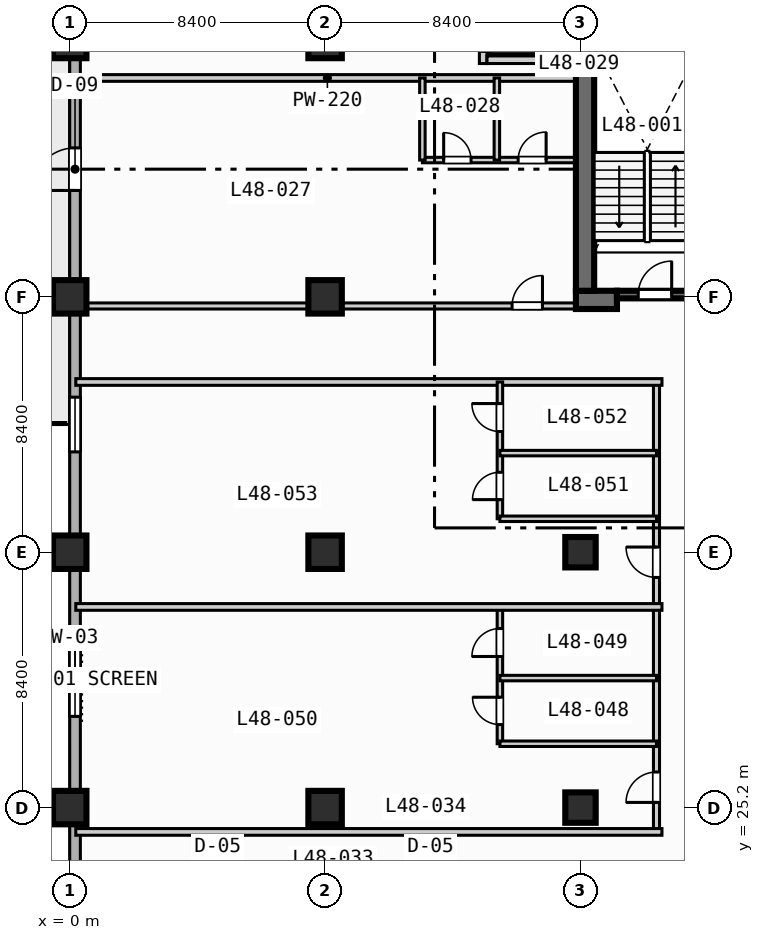
"""IFC4 building model, lengths in metres.
Left out: names, types, materials, properties, quantities, classifications, styles, units other than length and angle.
Written with IfcOpenShell. Run it as: python <this file> out.ifc"""

import sys

from ifc_helpers import new_model, si_unit, direction, frame, frame_2d, origin, origin_2d, place, context, subcontext, project, spatial, rectangle, extrude, element, fill, save


model = new_model("IFC4")
c1 = context("Model", 3, precision=1e-05, world=origin(), true_north=direction((0.0, 1.0)))
c2 = subcontext(c1, "Body", "Model", "MODEL_VIEW")
j1 = project(units=[si_unit("LENGTHUNIT", "METRE"), si_unit("PLANEANGLEUNIT", "RADIAN")], contexts=[c1])
p1 = place(None, origin())
s1 = spatial("IfcSite", under=j1, at=p1, CompositionType="ELEMENT")
p2 = place(p1, origin())
s2 = spatial("IfcBuilding", under=s1, at=p2, CompositionType="ELEMENT")
p3 = place(p2, frame((0.0, 0.0, 197.6)))
s3 = spatial("IfcBuildingStorey", under=s2, at=p3, CompositionType="ELEMENT", Elevation=197.6)
p4 = place(p3, frame((16.65, 41.9, 0.0), z_axis=(0.0, 0.0, 1.0), x_axis=(1.0, 0.0, 0.0)))
e1 = element("IfcWall", 1, at=p4, inside=s3, PredefinedType="SHEAR", context=c2, shape_type="SweptSolid", body=[
    extrude(rectangle(XDim=1.35, YDim=0.6, at=frame_2d((0.675, 0.0))), origin(), (0.0, 0.0, 1.0), 3.47),
])
p5 = place(p3, frame((16.95, 42.2, 0.0), z_axis=(0.0, 0.0, 1.0), x_axis=(0.0, 1.0, 0.0)))
e2 = element("IfcWall", 2, at=p5, inside=s3, PredefinedType="SHEAR", context=c2, shape_type="SweptSolid", body=[
    extrude(rectangle(XDim=16.35, YDim=0.6, at=frame_2d((8.175, 0.0))), origin(), (0.0, 0.0, 1.0), 3.47),
])
for number, where, z_axis, x_axis in (
    (3, (0.0, 25.2, 0.0), (0.0, 0.0, 1.0), (1.0, 0.0, 0.0)),
    (4, (0.0, 33.6, 0.0), (0.0, 0.0, 1.0), (1.0, 0.0, 0.0)),
    (5, (0.0, 42.0, 0.0), (0.0, 0.0, 1.0), (1.0, 0.0, 0.0)),
    (6, (0.0, 50.4, 0.0), (0.0, 0.0, 1.0), (1.0, 0.0, 0.0)),
    (7, (8.4, 25.2, 0.0), (0.0, 0.0, 1.0), (1.0, 0.0, 0.0)),
    (8, (8.4, 33.6, 0.0), (0.0, 0.0, 1.0), (1.0, 0.0, 0.0)),
    (9, (8.4, 42.0, 0.0), (0.0, 0.0, 1.0), (1.0, 0.0, 0.0)),
    (10, (8.4, 50.4, 0.0), (0.0, 0.0, 1.0), (1.0, 0.0, 0.0)),
):
    element("IfcColumn", number, at=place(p3, frame(where, z_axis=z_axis, x_axis=x_axis)), inside=s3, PredefinedType="COLUMN", context=c2, shape_type="SweptSolid", body=[
        extrude(rectangle(XDim=1.1, YDim=1.1, at=origin_2d()), origin(), (0.0, 0.0, 1.0), 3.7),
    ])
for number, where, z_axis, x_axis in (
    (11, (16.8, 25.2, 0.0), (0.0, 0.0, 1.0), (1.0, 0.0, 0.0)),
    (12, (16.8, 33.6, 0.0), (0.0, 0.0, 1.0), (1.0, 0.0, 0.0)),
):
    element("IfcColumn", number, at=place(p3, frame(where, z_axis=z_axis, x_axis=x_axis)), inside=s3, PredefinedType="COLUMN", context=c2, shape_type="SweptSolid", body=[
        extrude(rectangle(XDim=1.0, YDim=1.0, at=origin_2d()), origin(), (0.0, 0.0, 1.0), 3.7),
    ])
p6 = place(p3, frame((0.175, 3.175, 0.0), z_axis=(0.0, 0.0, 1.0), x_axis=(0.0, 1.0, 0.0)))
e13 = element("IfcWall", 13, at=p6, inside=s3, PredefinedType="STANDARD", context=c2, shape_type="SweptSolid", body=[
    extrude(rectangle(XDim=69.25, YDim=0.35, at=frame_2d((34.625, 0.0))), origin(), (0.0, 0.0, 1.0), 3.47),
])
p7 = place(p6, frame((42.325, 0.0, 0.0)))
e14 = element("IfcOpeningElement", 14, at=p7, cuts=e13, PredefinedType="OPENING", context=c2, shape_type="SweptSolid", body=[
    extrude(rectangle(XDim=1.4, YDim=2.2, at=frame_2d((0.7, 1.1))), frame((0.0, 0.185, 0.0), z_axis=(0.0, -1.0, 0.0), x_axis=(1.0, 0.0, 0.0)), (0.0, 0.0, 1.0), 0.37),
])
p8 = place(p6, frame((25.025, 0.0, 0.85)))
e15 = element("IfcOpeningElement", 15, at=p8, cuts=e13, PredefinedType="OPENING", context=c2, shape_type="SweptSolid", body=[
    extrude(rectangle(XDim=2.4, YDim=1.95, at=frame_2d((1.2, 0.975))), frame((0.0, 0.185, 0.0), z_axis=(0.0, -1.0, 0.0), x_axis=(1.0, 0.0, 0.0)), (0.0, 0.0, 1.0), 0.37),
])
p9 = place(p6, frame((33.725, 0.0, 0.85)))
e16 = element("IfcOpeningElement", 16, at=p9, cuts=e13, PredefinedType="OPENING", context=c2, shape_type="SweptSolid", body=[
    extrude(rectangle(XDim=1.8, YDim=1.8, at=frame_2d((0.9, 0.9))), frame((0.0, 0.185, 0.0), z_axis=(0.0, -1.0, 0.0), x_axis=(1.0, 0.0, 0.0)), (0.0, 0.0, 1.0), 0.37),
])
p10 = place(p6, frame((58.375, 0.0, 0.85)))
e17 = element("IfcOpeningElement", 17, at=p10, cuts=e13, PredefinedType="OPENING", context=c2, shape_type="SweptSolid", body=[
    extrude(rectangle(XDim=1.8, YDim=1.8, at=frame_2d((0.9, 0.9))), frame((0.0, 0.185, 0.0), z_axis=(0.0, -1.0, 0.0), x_axis=(1.0, 0.0, 0.0)), (0.0, 0.0, 1.0), 0.37),
])
p11 = place(p6, frame((64.775, 0.0, 0.85)))
e18 = element("IfcOpeningElement", 18, at=p11, cuts=e13, PredefinedType="OPENING", context=c2, shape_type="SweptSolid", body=[
    extrude(rectangle(XDim=1.8, YDim=1.8, at=frame_2d((0.9, 0.9))), frame((0.0, 0.185, 0.0), z_axis=(0.0, -1.0, 0.0), x_axis=(1.0, 0.0, 0.0)), (0.0, 0.0, 1.0), 0.37),
])
p12 = place(p3, frame((18.0, 42.075, 0.0), z_axis=(0.0, 0.0, 1.0), x_axis=(1.0, 0.0, 0.0)))
e19 = element("IfcWall", 19, at=p12, inside=s3, PredefinedType="SOLIDWALL", context=c2, shape_type="SweptSolid", body=[
    extrude(rectangle(XDim=2.5, YDim=0.25, at=frame_2d((1.25, 0.0))), origin(), (0.0, 0.0, 1.0), 3.47),
])
p13 = place(p12, frame((0.7, 0.0, 0.0)))
e20 = element("IfcOpeningElement", 20, at=p13, cuts=e19, PredefinedType="OPENING", context=c2, shape_type="SweptSolid", body=[
    extrude(rectangle(XDim=1.1, YDim=2.15, at=frame_2d((0.55, 1.075))), frame((0.0, 0.135, 0.0), z_axis=(0.0, -1.0, 0.0), x_axis=(1.0, 0.0, 0.0)), (0.0, 0.0, 1.0), 0.27),
])
p14 = place(p3, frame((13.6, 49.675, 0.0), z_axis=(0.0, 0.0, 1.0), x_axis=(0.0, 1.0, 0.0)))
e21 = element("IfcWall", 21, at=p14, inside=s3, PredefinedType="SOLIDWALL", context=c2, shape_type="SweptSolid", body=[
    extrude(rectangle(XDim=2.75, YDim=0.25, at=frame_2d((1.375, 0.0))), origin(), (0.0, 0.0, 1.0), 3.47),
])
p15 = place(p14, frame((0.4, 0.0, 0.0)))
e22 = element("IfcOpeningElement", 22, at=p15, cuts=e21, PredefinedType="OPENING", context=c2, shape_type="SweptSolid", body=[
    extrude(rectangle(XDim=1.1, YDim=2.15, at=frame_2d((0.55, 1.075))), frame((0.0, 0.135, 0.0), z_axis=(0.0, -1.0, 0.0), x_axis=(1.0, 0.0, 0.0)), (0.0, 0.0, 1.0), 0.27),
])
p16 = place(p3, frame((15.6, 49.675, 0.0), z_axis=(0.0, 0.0, 1.0), x_axis=(0.0, 1.0, 0.0)))
e23 = element("IfcWall", 23, at=p16, inside=s3, PredefinedType="SOLIDWALL", context=c2, shape_type="SweptSolid", body=[
    extrude(rectangle(XDim=2.75, YDim=0.25, at=frame_2d((1.375, 0.0))), origin(), (0.0, 0.0, 1.0), 3.47),
])
p17 = place(p3, frame((13.725, 49.8, 0.0), z_axis=(0.0, 0.0, 1.0), x_axis=(1.0, 0.0, 0.0)))
e24 = element("IfcWall", 24, at=p17, inside=s3, PredefinedType="SOLIDWALL", context=c2, shape_type="SweptSolid", body=[
    extrude(rectangle(XDim=1.75, YDim=0.25, at=frame_2d((0.875, 0.0))), origin(), (0.0, 0.0, 1.0), 3.47),
])
p18 = place(p3, frame((0.35, 41.7, 0.0), z_axis=(0.0, 0.0, 1.0), x_axis=(1.0, 0.0, 0.0)))
e25 = element("IfcWall", 25, at=p18, inside=s3, PredefinedType="PARTITIONING", context=c2, shape_type="SweptSolid", body=[
    extrude(rectangle(XDim=16.25, YDim=0.2, at=frame_2d((8.125, 0.0))), origin(), (0.0, 0.0, 1.0), 2.82),
])
p19 = place(p18, frame((14.2, 0.0, 0.0)))
e26 = element("IfcOpeningElement", 26, at=p19, cuts=e25, PredefinedType="OPENING", context=c2, shape_type="SweptSolid", body=[
    extrude(rectangle(XDim=1.0, YDim=2.15, at=frame_2d((0.5, 1.075))), frame((0.0, 0.11, 0.0), z_axis=(0.0, -1.0, 0.0), x_axis=(1.0, 0.0, 0.0)), (0.0, 0.0, 1.0), 0.22),
])
p20 = place(p3, frame((0.35, 49.2, 0.0), z_axis=(0.0, 0.0, 1.0), x_axis=(1.0, 0.0, 0.0)))
e27 = element("IfcWall", 27, at=p20, inside=s3, PredefinedType="PARTITIONING", context=c2, shape_type="SweptSolid", body=[
    extrude(rectangle(XDim=16.25, YDim=0.22, at=frame_2d((8.125, 0.0))), origin(), (0.0, 0.0, 1.0), 3.47),
])
p21 = place(p3, frame((11.6, 46.5, 0.0), z_axis=(0.0, 0.0, 1.0), x_axis=(1.0, 0.0, 0.0)))
e28 = element("IfcWall", 28, at=p21, inside=s3, PredefinedType="PLUMBINGWALL", context=c2, shape_type="SweptSolid", body=[
    extrude(rectangle(XDim=5.0, YDim=0.18, at=frame_2d((2.5, 0.0))), origin(), (0.0, 0.0, 1.0), 3.47),
])
p22 = place(p21, frame((0.7, 0.0, 0.0)))
e29 = element("IfcOpeningElement", 29, at=p22, cuts=e28, PredefinedType="OPENING", context=c2, shape_type="SweptSolid", body=[
    extrude(rectangle(XDim=0.9, YDim=2.1, at=frame_2d((0.45, 1.05))), frame((0.0, 0.1, 0.0), z_axis=(0.0, -1.0, 0.0), x_axis=(1.0, 0.0, 0.0)), (0.0, 0.0, 1.0), 0.2),
])
p23 = place(p21, frame((3.15, 0.0, 0.0)))
e30 = element("IfcOpeningElement", 30, at=p23, cuts=e28, PredefinedType="OPENING", context=c2, shape_type="SweptSolid", body=[
    extrude(rectangle(XDim=0.92, YDim=2.1, at=frame_2d((0.46, 1.05))), frame((0.0, 0.1, 0.0), z_axis=(0.0, -1.0, 0.0), x_axis=(1.0, 0.0, 0.0)), (0.0, 0.0, 1.0), 0.2),
])
for number, where, z_axis, x_axis in (
    (31, (11.6, 46.5, 0.0), (0.0, 0.0, 1.0), (0.0, 1.0, 0.0)),
    (32, (14.05, 46.5, 0.0), (0.0, 0.0, 1.0), (0.0, 1.0, 0.0)),
):
    element("IfcWall", number, at=place(p3, frame(where, z_axis=z_axis, x_axis=x_axis)), inside=s3, PredefinedType="PLUMBINGWALL", context=c2, shape_type="SweptSolid", body=[
        extrude(rectangle(XDim=2.7, YDim=0.18, at=frame_2d((1.35, 0.0))), origin(), (0.0, 0.0, 1.0), 3.47),
    ])
p24 = place(p3, frame((19.3, 24.4, 0.0), z_axis=(0.0, 0.0, 1.0), x_axis=(0.0, 1.0, 0.0)))
e33 = element("IfcWall", 33, at=p24, inside=s3, PredefinedType="PARTITIONING", context=c2, shape_type="SweptSolid", body=[
    extrude(rectangle(XDim=14.8, YDim=0.2, at=frame_2d((7.4, 0.0))), origin(), (0.0, 0.0, 1.0), 3.47),
])
p25 = place(p24, frame((0.97, 0.0, 0.0)))
e34 = element("IfcOpeningElement", 34, at=p25, cuts=e33, PredefinedType="OPENING", context=c2, shape_type="SweptSolid", body=[
    extrude(rectangle(XDim=1.0, YDim=2.15, at=frame_2d((0.5, 1.075))), frame((0.0, 0.11, 0.0), z_axis=(0.0, -1.0, 0.0), x_axis=(1.0, 0.0, 0.0)), (0.0, 0.0, 1.0), 0.22),
])
p26 = place(p24, frame((8.37, 0.0, 0.0)))
e35 = element("IfcOpeningElement", 35, at=p26, cuts=e33, PredefinedType="OPENING", context=c2, shape_type="SweptSolid", body=[
    extrude(rectangle(XDim=1.0, YDim=2.15, at=frame_2d((0.5, 1.075))), frame((0.0, 0.11, 0.0), z_axis=(0.0, -1.0, 0.0), x_axis=(1.0, 0.0, 0.0)), (0.0, 0.0, 1.0), 0.22),
])
p27 = place(p3, frame((0.2, 24.4, 0.0), z_axis=(0.0, 0.0, 1.0), x_axis=(1.0, 0.0, 0.0)))
e36 = element("IfcWall", 36, at=p27, inside=s3, PredefinedType="PARTITIONING", context=c2, shape_type="SweptSolid", body=[
    extrude(rectangle(XDim=19.28, YDim=0.22, at=frame_2d((9.64, 0.0))), origin(), (0.0, 0.0, 1.0), 3.47),
])
p28 = place(p3, frame((14.15, 27.3, 0.0), z_axis=(0.0, 0.0, 1.0), x_axis=(0.0, 1.0, 0.0)))
e37 = element("IfcWall", 37, at=p28, inside=s3, PredefinedType="PLUMBINGWALL", context=c2, shape_type="SweptSolid", body=[
    extrude(rectangle(XDim=4.5, YDim=0.18, at=frame_2d((2.25, 0.0))), origin(), (0.0, 0.0, 1.0), 3.47),
])
p29 = place(p28, frame((0.63, 0.0, 0.0)))
e38 = element("IfcOpeningElement", 38, at=p29, cuts=e37, PredefinedType="OPENING", context=c2, shape_type="SweptSolid", body=[
    extrude(rectangle(XDim=0.9, YDim=2.1, at=frame_2d((0.45, 1.05))), frame((0.0, 0.1, 0.0), z_axis=(0.0, -1.0, 0.0), x_axis=(1.0, 0.0, 0.0)), (0.0, 0.0, 1.0), 0.2),
])
p30 = place(p28, frame((2.87, 0.0, 0.0)))
e39 = element("IfcOpeningElement", 39, at=p30, cuts=e37, PredefinedType="OPENING", context=c2, shape_type="SweptSolid", body=[
    extrude(rectangle(XDim=0.92, YDim=2.1, at=frame_2d((0.46, 1.05))), frame((0.0, 0.1, 0.0), z_axis=(0.0, -1.0, 0.0), x_axis=(1.0, 0.0, 0.0)), (0.0, 0.0, 1.0), 0.2),
])
for number, where, z_axis, x_axis in (
    (40, (14.15, 27.3, 0.0), (0.0, 0.0, 1.0), (1.0, 0.0, 0.0)),
    (41, (14.15, 29.46, 0.0), (0.0, 0.0, 1.0), (1.0, 0.0, 0.0)),
):
    element("IfcWall", number, at=place(p3, frame(where, z_axis=z_axis, x_axis=x_axis)), inside=s3, PredefinedType="PLUMBINGWALL", context=c2, shape_type="SweptSolid", body=[
        extrude(rectangle(XDim=5.15, YDim=0.18, at=frame_2d((2.575, 0.0))), origin(), (0.0, 0.0, 1.0), 3.47),
    ])
for number, where, z_axis, x_axis in (
    (42, (0.2, 31.8, 0.0), (0.0, 0.0, 1.0), (1.0, 0.0, 0.0)),
    (43, (0.2, 39.2, 0.0), (0.0, 0.0, 1.0), (1.0, 0.0, 0.0)),
):
    element("IfcWall", number, at=place(p3, frame(where, z_axis=z_axis, x_axis=x_axis)), inside=s3, PredefinedType="PARTITIONING", context=c2, shape_type="SweptSolid", body=[
        extrude(rectangle(XDim=19.28, YDim=0.22, at=frame_2d((9.64, 0.0))), origin(), (0.0, 0.0, 1.0), 3.47),
    ])
p31 = place(p3, frame((14.15, 34.7, 0.0), z_axis=(0.0, 0.0, 1.0), x_axis=(0.0, 1.0, 0.0)))
e44 = element("IfcWall", 44, at=p31, inside=s3, PredefinedType="PLUMBINGWALL", context=c2, shape_type="SweptSolid", body=[
    extrude(rectangle(XDim=4.5, YDim=0.18, at=frame_2d((2.25, 0.0))), origin(), (0.0, 0.0, 1.0), 3.47),
])
p32 = place(p31, frame((0.63, 0.0, 0.0)))
e45 = element("IfcOpeningElement", 45, at=p32, cuts=e44, PredefinedType="OPENING", context=c2, shape_type="SweptSolid", body=[
    extrude(rectangle(XDim=0.9, YDim=2.1, at=frame_2d((0.45, 1.05))), frame((0.0, 0.1, 0.0), z_axis=(0.0, -1.0, 0.0), x_axis=(1.0, 0.0, 0.0)), (0.0, 0.0, 1.0), 0.2),
])
p33 = place(p31, frame((2.87, 0.0, 0.0)))
e46 = element("IfcOpeningElement", 46, at=p33, cuts=e44, PredefinedType="OPENING", context=c2, shape_type="SweptSolid", body=[
    extrude(rectangle(XDim=0.92, YDim=2.1, at=frame_2d((0.46, 1.05))), frame((0.0, 0.1, 0.0), z_axis=(0.0, -1.0, 0.0), x_axis=(1.0, 0.0, 0.0)), (0.0, 0.0, 1.0), 0.2),
])
for number, where, z_axis, x_axis in (
    (47, (14.15, 34.7, 0.0), (0.0, 0.0, 1.0), (1.0, 0.0, 0.0)),
    (48, (14.15, 36.86, 0.0), (0.0, 0.0, 1.0), (1.0, 0.0, 0.0)),
):
    element("IfcWall", number, at=place(p3, frame(where, z_axis=z_axis, x_axis=x_axis)), inside=s3, PredefinedType="PLUMBINGWALL", context=c2, shape_type="SweptSolid", body=[
        extrude(rectangle(XDim=5.15, YDim=0.18, at=frame_2d((2.575, 0.0))), origin(), (0.0, 0.0, 1.0), 3.47),
    ])
p34 = place(p7, origin())
e49 = element("IfcDoor", 49, at=p34, inside=s3, OperationType="SINGLE_SWING_LEFT", PredefinedType="DOOR", context=c2, shape_type="SweptSolid", body=[
    extrude(rectangle(XDim=1.4, YDim=2.2, at=frame_2d((0.7, 1.1))), frame((0.0, 0.025, 0.0), z_axis=(0.0, -1.0, 0.0), x_axis=(1.0, 0.0, 0.0)), (0.0, 0.0, 1.0), 0.05),
])
fill(e14, e49)
p35 = place(p8, origin())
e50 = element("IfcWindow", 50, at=p35, inside=s3, PartitioningType="SINGLE_PANEL", PredefinedType="WINDOW", context=c2, shape_type="SweptSolid", body=[
    extrude(rectangle(XDim=2.4, YDim=1.95, at=frame_2d((1.2, 0.975))), frame((0.0, 0.03, 0.0), z_axis=(0.0, -1.0, 0.0), x_axis=(1.0, 0.0, 0.0)), (0.0, 0.0, 1.0), 0.06),
])
fill(e15, e50)
p36 = place(p9, origin())
e51 = element("IfcWindow", 51, at=p36, inside=s3, PartitioningType="SINGLE_PANEL", PredefinedType="WINDOW", context=c2, shape_type="SweptSolid", body=[
    extrude(rectangle(XDim=1.8, YDim=1.8, at=frame_2d((0.9, 0.9))), frame((0.0, 0.03, 0.0), z_axis=(0.0, -1.0, 0.0), x_axis=(1.0, 0.0, 0.0)), (0.0, 0.0, 1.0), 0.06),
])
fill(e16, e51)
p37 = place(p13, origin())
e52 = element("IfcDoor", 52, at=p37, inside=s3, OperationType="SINGLE_SWING_RIGHT", PredefinedType="DOOR", context=c2, shape_type="SweptSolid", body=[
    extrude(rectangle(XDim=1.1, YDim=2.15, at=frame_2d((0.55, 1.075))), frame((0.0, 0.025, 0.0), z_axis=(0.0, -1.0, 0.0), x_axis=(1.0, 0.0, 0.0)), (0.0, 0.0, 1.0), 0.05),
])
fill(e20, e52)
p38 = place(p19, origin())
e53 = element("IfcDoor", 53, at=p38, inside=s3, OperationType="SINGLE_SWING_RIGHT", PredefinedType="DOOR", context=c2, shape_type="SweptSolid", body=[
    extrude(rectangle(XDim=1.0, YDim=2.15, at=frame_2d((0.5, 1.075))), frame((0.0, 0.025, 0.0), z_axis=(0.0, -1.0, 0.0), x_axis=(1.0, 0.0, 0.0)), (0.0, 0.0, 1.0), 0.05),
])
fill(e26, e53)
p39 = place(p22, origin())
e54 = element("IfcDoor", 54, at=p39, inside=s3, OperationType="SINGLE_SWING_LEFT", PredefinedType="DOOR", context=c2, shape_type="SweptSolid", body=[
    extrude(rectangle(XDim=0.9, YDim=2.1, at=frame_2d((0.45, 1.05))), frame((0.0, 0.025, 0.0), z_axis=(0.0, -1.0, 0.0), x_axis=(1.0, 0.0, 0.0)), (0.0, 0.0, 1.0), 0.05),
])
fill(e29, e54)
p40 = place(p23, origin())
e55 = element("IfcDoor", 55, at=p40, inside=s3, OperationType="SINGLE_SWING_RIGHT", PredefinedType="DOOR", context=c2, shape_type="SweptSolid", body=[
    extrude(rectangle(XDim=0.92, YDim=2.1, at=frame_2d((0.46, 1.05))), frame((0.0, 0.025, 0.0), z_axis=(0.0, -1.0, 0.0), x_axis=(1.0, 0.0, 0.0)), (0.0, 0.0, 1.0), 0.05),
])
fill(e30, e55)
p41 = place(p25, origin())
e56 = element("IfcDoor", 56, at=p41, inside=s3, OperationType="SINGLE_SWING_LEFT", PredefinedType="DOOR", context=c2, shape_type="SweptSolid", body=[
    extrude(rectangle(XDim=1.0, YDim=2.15, at=frame_2d((0.5, 1.075))), frame((0.0, 0.025, 0.0), z_axis=(0.0, -1.0, 0.0), x_axis=(1.0, 0.0, 0.0)), (0.0, 0.0, 1.0), 0.05),
])
fill(e34, e56)
p42 = place(p26, origin())
e57 = element("IfcDoor", 57, at=p42, inside=s3, OperationType="SINGLE_SWING_RIGHT", PredefinedType="DOOR", context=c2, shape_type="SweptSolid", body=[
    extrude(rectangle(XDim=1.0, YDim=2.15, at=frame_2d((0.5, 1.075))), frame((0.0, 0.025, 0.0), z_axis=(0.0, -1.0, 0.0), x_axis=(1.0, 0.0, 0.0)), (0.0, 0.0, 1.0), 0.05),
])
fill(e35, e57)
p43 = place(p29, origin())
e58 = element("IfcDoor", 58, at=p43, inside=s3, OperationType="SINGLE_SWING_RIGHT", PredefinedType="DOOR", context=c2, shape_type="SweptSolid", body=[
    extrude(rectangle(XDim=0.9, YDim=2.1, at=frame_2d((0.45, 1.05))), frame((0.0, 0.025, 0.0), z_axis=(0.0, -1.0, 0.0), x_axis=(1.0, 0.0, 0.0)), (0.0, 0.0, 1.0), 0.05),
])
fill(e38, e58)
p44 = place(p30, origin())
e59 = element("IfcDoor", 59, at=p44, inside=s3, OperationType="SINGLE_SWING_LEFT", PredefinedType="DOOR", context=c2, shape_type="SweptSolid", body=[
    extrude(rectangle(XDim=0.92, YDim=2.1, at=frame_2d((0.46, 1.05))), frame((0.0, 0.025, 0.0), z_axis=(0.0, -1.0, 0.0), x_axis=(1.0, 0.0, 0.0)), (0.0, 0.0, 1.0), 0.05),
])
fill(e39, e59)
p45 = place(p32, origin())
e60 = element("IfcDoor", 60, at=p45, inside=s3, OperationType="SINGLE_SWING_LEFT", PredefinedType="DOOR", context=c2, shape_type="SweptSolid", body=[
    extrude(rectangle(XDim=0.9, YDim=2.1, at=frame_2d((0.45, 1.05))), frame((0.0, 0.025, 0.0), z_axis=(0.0, -1.0, 0.0), x_axis=(1.0, 0.0, 0.0)), (0.0, 0.0, 1.0), 0.05),
])
fill(e45, e60)
p46 = place(p33, origin())
e61 = element("IfcDoor", 61, at=p46, inside=s3, OperationType="SINGLE_SWING_RIGHT", PredefinedType="DOOR", context=c2, shape_type="SweptSolid", body=[
    extrude(rectangle(XDim=0.92, YDim=2.1, at=frame_2d((0.46, 1.05))), frame((0.0, 0.025, 0.0), z_axis=(0.0, -1.0, 0.0), x_axis=(1.0, 0.0, 0.0)), (0.0, 0.0, 1.0), 0.05),
])
fill(e46, e61)
save(model, sys.argv[1])
